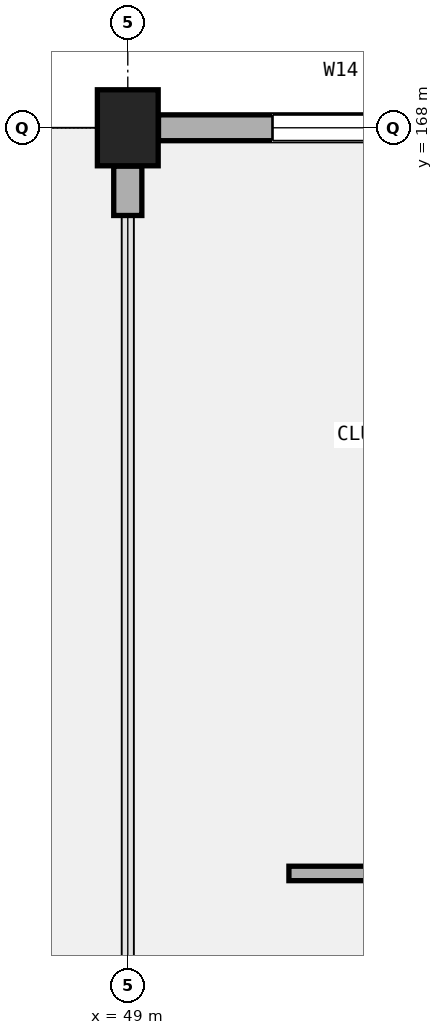
"""IFC4 building model, lengths in metres.
Left out: names, types, materials, properties, quantities, classifications, styles, units other than length and angle.
Written with IfcOpenShell. Run it as: python <this file> out.ifc"""

import sys

from ifc_helpers import new_model, si_unit, direction, frame, frame_2d, origin, origin_2d, place, context, subcontext, project, spatial, rectangle, extrude, element, fill, save


model = new_model("IFC4")
c1 = context("Model", 3, precision=1e-05, world=origin(), true_north=direction((0.0, 1.0)))
c2 = subcontext(c1, "Body", "Model", "MODEL_VIEW")
j1 = project(units=[si_unit("LENGTHUNIT", "METRE"), si_unit("PLANEANGLEUNIT", "RADIAN")], contexts=[c1])
p1 = place(None, origin())
s1 = spatial("IfcSite", under=j1, at=p1, CompositionType="ELEMENT")
p2 = place(p1, origin())
s2 = spatial("IfcBuilding", under=s1, at=p2, CompositionType="ELEMENT")
p3 = place(p2, frame((0.0, 0.0, 10.2)))
s3 = spatial("IfcBuildingStorey", under=s2, at=p3, CompositionType="ELEMENT", Elevation=10.2)
p4 = place(p3, frame((49.0, 168.0, 0.0), z_axis=(0.0, 0.0, 1.0), x_axis=(1.0, 0.0, 0.0)))
e1 = element("IfcColumn", 1, at=p4, inside=s3, PredefinedType="COLUMN", context=c2, shape_type="SweptSolid", body=[
    extrude(rectangle(XDim=0.8, YDim=1.0, at=origin_2d()), origin(), (0.0, 0.0, 1.0), 5.1),
])
p5 = place(p3, frame((49.404, 168.0, 0.0), z_axis=(0.0, 0.0, 1.0), x_axis=(1.0, 0.0, 0.0)))
e2 = element("IfcWall", 2, at=p5, inside=s3, PredefinedType="SOLIDWALL", context=c2, shape_type="SweptSolid", body=[
    extrude(rectangle(XDim=11.642, YDim=0.34, at=frame_2d((5.821, 0.0))), origin(), (0.0, 0.0, 1.0), 4.02),
])
p6 = place(p5, frame((1.5, 0.0, 0.95)))
e3 = element("IfcOpeningElement", 3, at=p6, cuts=e2, PredefinedType="OPENING", context=c2, shape_type="SweptSolid", body=[
    extrude(rectangle(XDim=1.8, YDim=2.15, at=frame_2d((0.9, 1.075))), frame((0.0, 0.18, 0.0), z_axis=(0.0, -1.0, 0.0), x_axis=(1.0, 0.0, 0.0)), (0.0, 0.0, 1.0), 0.36),
])
p7 = place(p3, frame((49.0, 166.846, 0.0), z_axis=(0.0, 0.0, 1.0), x_axis=(0.0, 1.0, 0.0)))
e4 = element("IfcWall", 4, at=p7, inside=s3, PredefinedType="SOLIDWALL", context=c2, shape_type="SweptSolid", body=[
    extrude(rectangle(XDim=0.65, YDim=0.37, at=frame_2d((0.325, 0.0))), origin(), (0.0, 0.0, 1.0), 4.232),
])
p8 = place(p3, frame((51.12, 158.19, 0.0), z_axis=(0.0, 0.0, 1.0), x_axis=(1.0, 0.0, 0.0)))
e5 = element("IfcWall", 5, at=p8, inside=s3, PredefinedType="PARTITIONING", context=c2, shape_type="SweptSolid", body=[
    extrude(rectangle(XDim=10.22, YDim=0.19, at=frame_2d((5.11, 0.0))), origin(), (0.0, 0.0, 1.0), 4.22),
])
p9 = place(p8, frame((4.61, 0.0, 0.0)))
e6 = element("IfcOpeningElement", 6, at=p9, cuts=e5, PredefinedType="OPENING", context=c2, shape_type="SweptSolid", body=[
    extrude(rectangle(XDim=1.0, YDim=2.14, at=frame_2d((0.5, 1.07))), frame((0.0, 0.105, 0.0), z_axis=(0.0, -1.0, 0.0), x_axis=(1.0, 0.0, 0.0)), (0.0, 0.0, 1.0), 0.21),
])
p10 = place(p6, origin())
e7 = element("IfcWindow", 7, at=p10, inside=s3, PartitioningType="SINGLE_PANEL", PredefinedType="WINDOW", context=c2, shape_type="SweptSolid", body=[
    extrude(rectangle(XDim=1.8, YDim=2.15, at=frame_2d((0.9, 1.075))), frame((0.0, 0.03, 0.0), z_axis=(0.0, -1.0, 0.0), x_axis=(1.0, 0.0, 0.0)), (0.0, 0.0, 1.0), 0.06),
])
fill(e3, e7)
save(model, sys.argv[1])
